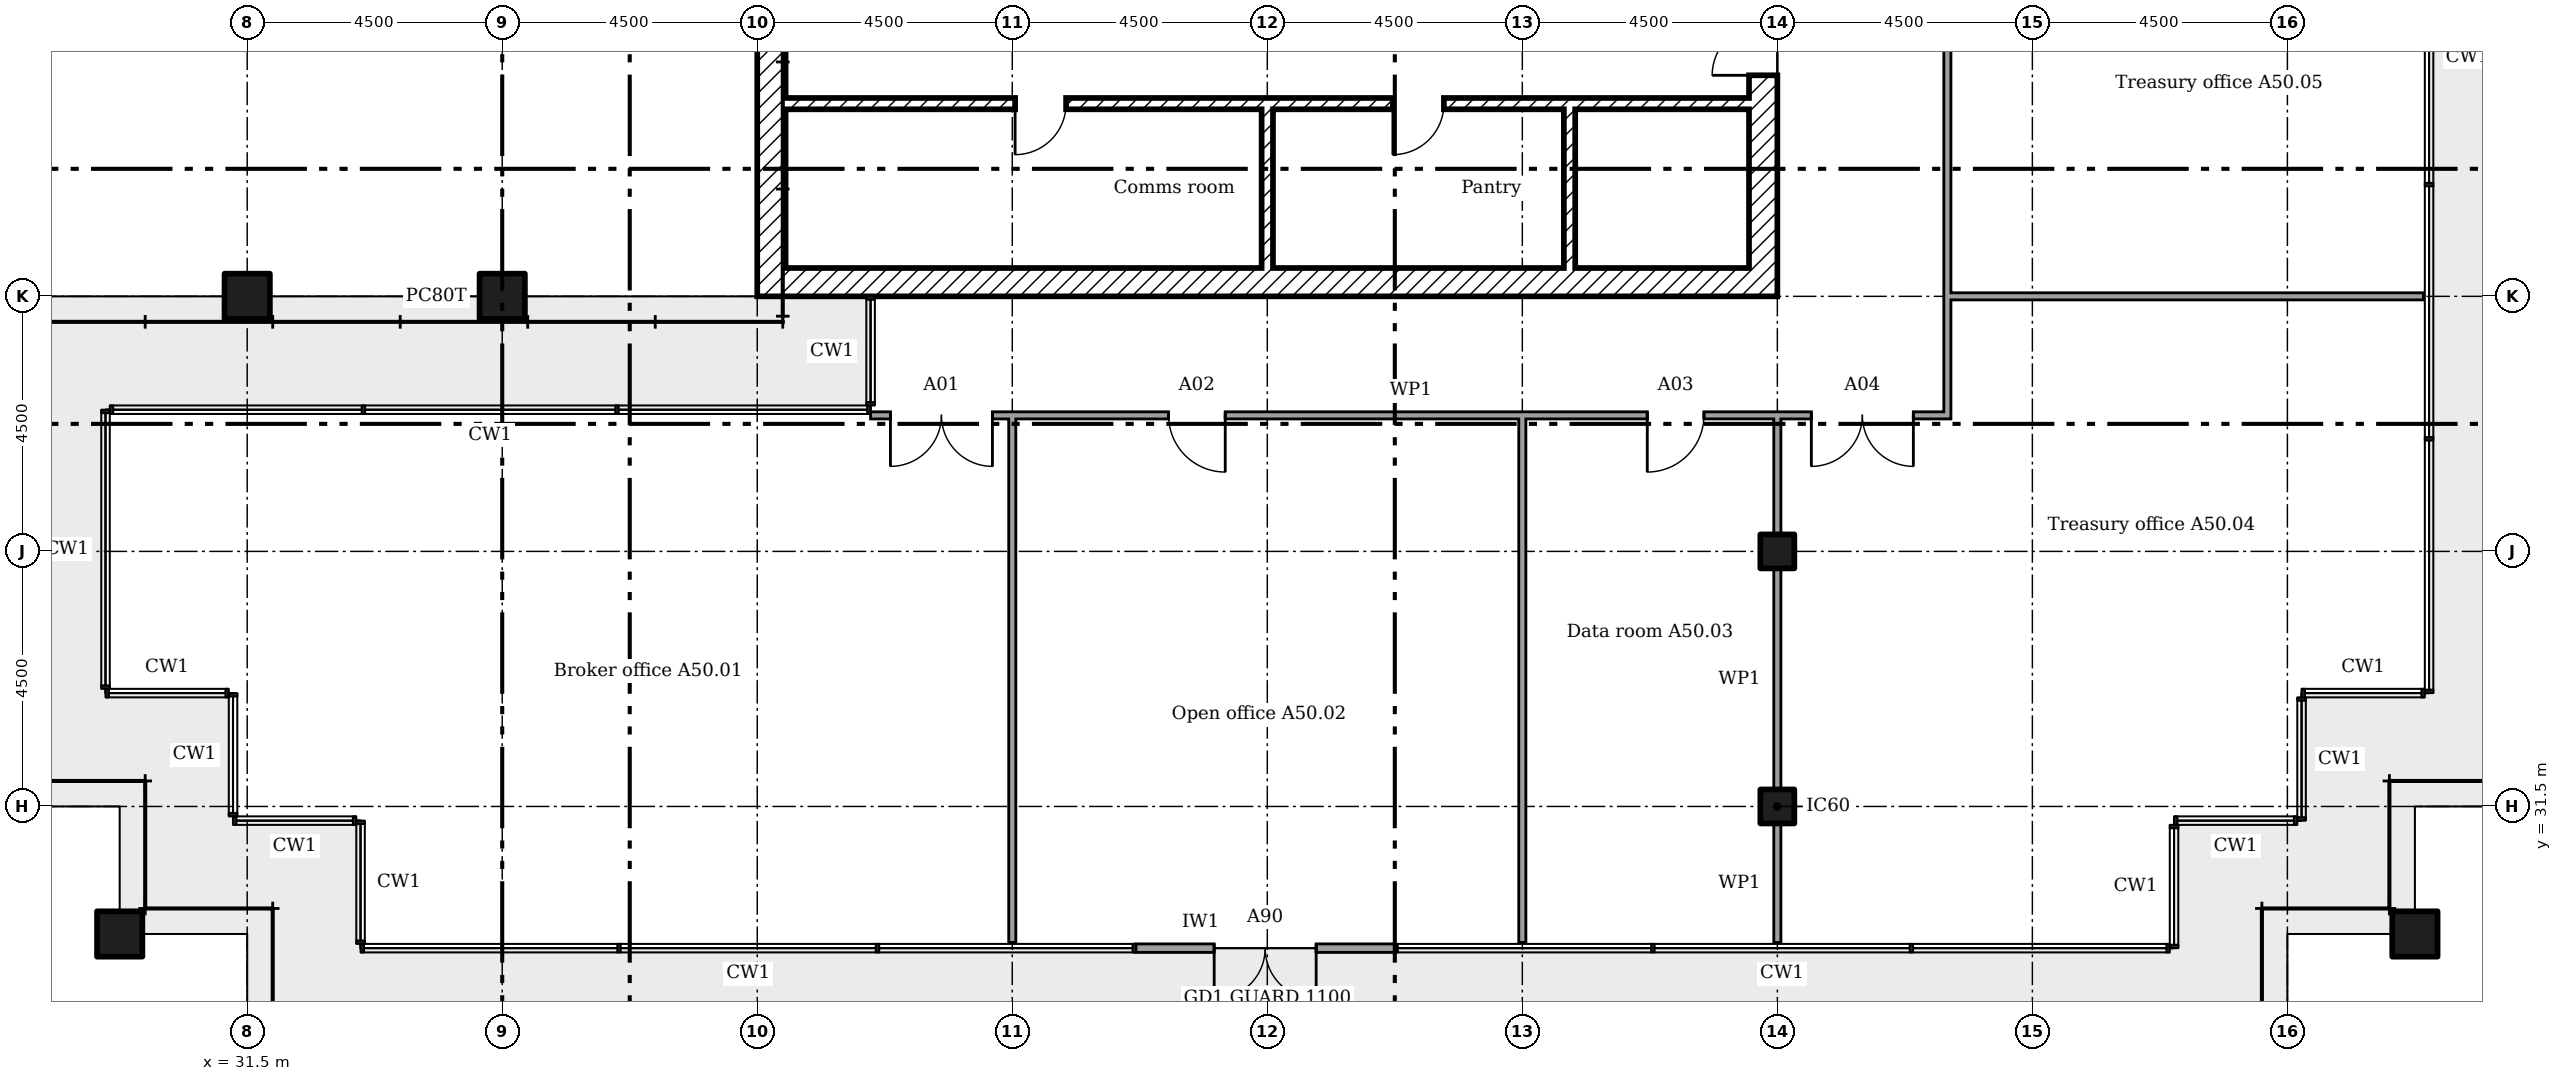
"""IFC4 building model, lengths in metres.
Left out: names, types, materials, properties, quantities, classifications, styles, units other than length and angle.
Written with IfcOpenShell. Run it as: python <this file> out.ifc"""

import sys

from ifc_helpers import new_model, si_unit, direction, frame, frame_2d, origin, origin_2d, place, context, subcontext, project, spatial, rectangle, extrude, element, fill, save


model = new_model("IFC4")
c1 = context("Model", 3, precision=1e-05, world=origin(), true_north=direction((0.0, 1.0)))
c2 = subcontext(c1, "Body", "Model", "MODEL_VIEW")
j1 = project(units=[si_unit("LENGTHUNIT", "METRE"), si_unit("PLANEANGLEUNIT", "RADIAN")], contexts=[c1])
p1 = place(None, origin())
s1 = spatial("IfcSite", under=j1, at=p1, CompositionType="ELEMENT")
p2 = place(p1, origin())
s2 = spatial("IfcBuilding", under=s1, at=p2, CompositionType="ELEMENT")
p3 = place(p2, frame((0.0, 0.0, 199.2)))
s3 = spatial("IfcBuildingStorey", under=s2, at=p3, CompositionType="ELEMENT", Elevation=199.2)
for number, where in (
    (1, (69.75, 29.25, 0.0)),
    (2, (36.0, 40.5, 0.0)),
    (3, (31.5, 40.5, 0.0)),
    (4, (29.25, 29.25, 0.0)),
):
    element("IfcColumn", number, at=place(p3, frame(where)), inside=s3, PredefinedType="COLUMN", context=c2, shape_type="SweptSolid", body=[
        extrude(rectangle(XDim=0.8, YDim=0.8, at=origin_2d()), origin(), (0.0, 0.0, 1.0), 3.6),
    ])
for number, where in (
    (5, (58.5, 31.5, 0.0)),
    (6, (58.5, 36.0, 0.0)),
):
    element("IfcColumn", number, at=place(p3, frame(where)), inside=s3, PredefinedType="COLUMN", context=c2, shape_type="SweptSolid", body=[
        extrude(rectangle(XDim=0.6, YDim=0.6, at=origin_2d()), origin(), (0.0, 0.0, 1.0), 3.6),
    ])
p4 = place(p3, frame((47.182, 29.0, 0.0)))
e7 = element("IfcWall", 7, at=p4, inside=s3, PredefinedType="SOLIDWALL", context=c2, shape_type="SweptSolid", body=[
    extrude(rectangle(XDim=4.561, YDim=0.15, at=frame_2d((2.28, 0.0))), origin(), (0.0, 0.0, 1.0), 3.45),
])
p5 = place(p4, frame((1.38, 0.0, 0.0)))
e8 = element("IfcOpeningElement", 8, at=p5, cuts=e7, PredefinedType="OPENING", context=c2, shape_type="SweptSolid", body=[
    extrude(rectangle(XDim=1.8, YDim=2.4, at=frame_2d((0.9, 1.2))), frame((0.0, 0.085, 0.0), z_axis=(0.0, -1.0, 0.0), x_axis=(1.0, 0.0, 0.0)), (0.0, 0.0, 1.0), 0.17),
])
p6 = place(p3, frame((58.25, 40.5, 0.0), z_axis=(0.0, 0.0, 1.0), x_axis=(0.0, 1.0, 0.0)))
e9 = element("IfcWall", 9, at=p6, inside=s3, PredefinedType="SHEAR", context=c2, shape_type="SweptSolid", body=[
    extrude(rectangle(XDim=18.0, YDim=0.5, at=frame_2d((9.0, 0.0))), origin(), (0.0, 0.0, 1.0), 3.35),
])
p7 = place(p6, frame((13.15, 0.0, 0.0)))
e10 = element("IfcOpeningElement", 10, at=p7, cuts=e9, PredefinedType="OPENING", context=c2, shape_type="SweptSolid", body=[
    extrude(rectangle(XDim=1.2, YDim=2.1, at=frame_2d((0.6, 1.05))), frame((0.0, 0.26, 0.0), z_axis=(0.0, -1.0, 0.0), x_axis=(1.0, 0.0, 0.0)), (0.0, 0.0, 1.0), 0.52),
])
p8 = place(p6, frame((3.9, 0.0, 0.0)))
e11 = element("IfcOpeningElement", 11, at=p8, cuts=e9, PredefinedType="OPENING", context=c2, shape_type="SweptSolid", body=[
    extrude(rectangle(XDim=1.8, YDim=2.1, at=frame_2d((0.9, 1.05))), frame((0.0, 0.26, 0.0), z_axis=(0.0, -1.0, 0.0), x_axis=(1.0, 0.0, 0.0)), (0.0, 0.0, 1.0), 0.52),
])
p9 = place(p6, frame((11.525, 0.0, 0.0)))
e12 = element("IfcOpeningElement", 12, at=p9, cuts=e9, PredefinedType="OPENING", context=c2, shape_type="SweptSolid", body=[
    extrude(rectangle(XDim=1.0, YDim=2.1, at=frame_2d((0.5, 1.05))), frame((0.0, 0.26, 0.0), z_axis=(0.0, -1.0, 0.0), x_axis=(1.0, 0.0, 0.0)), (0.0, 0.0, 1.0), 0.52),
])
p10 = place(p3, frame((40.5, 40.75, 0.0)))
e13 = element("IfcWall", 13, at=p10, inside=s3, PredefinedType="SHEAR", context=c2, shape_type="SweptSolid", body=[
    extrude(rectangle(XDim=17.5, YDim=0.5, at=frame_2d((8.75, 0.0))), origin(), (0.0, 0.0, 1.0), 3.35),
])
p11 = place(p3, frame((40.75, 41.0, 0.0), z_axis=(0.0, 0.0, 1.0), x_axis=(0.0, 1.0, 0.0)))
e14 = element("IfcWall", 14, at=p11, inside=s3, PredefinedType="SHEAR", context=c2, shape_type="SweptSolid", body=[
    extrude(rectangle(XDim=17.0, YDim=0.5, at=frame_2d((8.5, 0.0))), origin(), (0.0, 0.0, 1.0), 3.35),
])
for number, where, z_axis, x_axis in (
    (15, (49.5, 41.0, 0.0), (0.0, 0.0, 1.0), (0.0, 1.0, 0.0)),
    (16, (54.833, 41.0, 0.0), (0.0, 0.0, 1.0), (0.0, 1.0, 0.0)),
):
    element("IfcWall", number, at=place(p3, frame(where, z_axis=z_axis, x_axis=x_axis)), inside=s3, PredefinedType="SHEAR", context=c2, shape_type="SweptSolid", body=[
        extrude(rectangle(XDim=2.8, YDim=0.2, at=frame_2d((1.4, 0.0))), origin(), (0.0, 0.0, 1.0), 3.35),
    ])
p12 = place(p3, frame((41.0, 43.9, 0.0)))
e17 = element("IfcWall", 17, at=p12, inside=s3, PredefinedType="SHEAR", context=c2, shape_type="SweptSolid", body=[
    extrude(rectangle(XDim=17.0, YDim=0.2, at=frame_2d((8.5, 0.0))), origin(), (0.0, 0.0, 1.0), 3.35),
])
p13 = place(p12, frame((4.05, 0.0, 0.0)))
e18 = element("IfcOpeningElement", 18, at=p13, cuts=e17, PredefinedType="OPENING", context=c2, shape_type="SweptSolid", body=[
    extrude(rectangle(XDim=0.9, YDim=2.1, at=frame_2d((0.45, 1.05))), frame((0.0, 0.11, 0.0), z_axis=(0.0, -1.0, 0.0), x_axis=(1.0, 0.0, 0.0)), (0.0, 0.0, 1.0), 0.22),
])
p14 = place(p12, frame((10.717, 0.0, 0.0)))
e19 = element("IfcOpeningElement", 19, at=p14, cuts=e17, PredefinedType="OPENING", context=c2, shape_type="SweptSolid", body=[
    extrude(rectangle(XDim=0.9, YDim=2.1, at=frame_2d((0.45, 1.05))), frame((0.0, 0.11, 0.0), z_axis=(0.0, -1.0, 0.0), x_axis=(1.0, 0.0, 0.0)), (0.0, 0.0, 1.0), 0.22),
])
p15 = place(p3, frame((42.5, 38.4, 0.0)))
e20 = element("IfcWall", 20, at=p15, inside=s3, PredefinedType="PARTITIONING", context=c2, shape_type="SweptSolid", body=[
    extrude(rectangle(XDim=19.062, YDim=0.125, at=frame_2d((9.531, 0.0))), origin(), (0.0, 0.0, 1.0), 3.45),
])
p16 = place(p15, frame((0.35, 0.0, 0.0)))
e21 = element("IfcOpeningElement", 21, at=p16, cuts=e20, PredefinedType="OPENING", context=c2, shape_type="SweptSolid", body=[
    extrude(rectangle(XDim=1.8, YDim=2.1, at=frame_2d((0.9, 1.05))), frame((0.0, 0.073, 0.0), z_axis=(0.0, -1.0, 0.0), x_axis=(1.0, 0.0, 0.0)), (0.0, 0.0, 1.0), 0.145),
])
p17 = place(p15, frame((5.258, 0.0, 0.0)))
e22 = element("IfcOpeningElement", 22, at=p17, cuts=e20, PredefinedType="OPENING", context=c2, shape_type="SweptSolid", body=[
    extrude(rectangle(XDim=1.0, YDim=2.1, at=frame_2d((0.5, 1.05))), frame((0.0, 0.073, 0.0), z_axis=(0.0, -1.0, 0.0), x_axis=(1.0, 0.0, 0.0)), (0.0, 0.0, 1.0), 0.145),
])
p18 = place(p15, frame((13.705, 0.0, 0.0)))
e23 = element("IfcOpeningElement", 23, at=p18, cuts=e20, PredefinedType="OPENING", context=c2, shape_type="SweptSolid", body=[
    extrude(rectangle(XDim=1.0, YDim=2.1, at=frame_2d((0.5, 1.05))), frame((0.0, 0.073, 0.0), z_axis=(0.0, -1.0, 0.0), x_axis=(1.0, 0.0, 0.0)), (0.0, 0.0, 1.0), 0.145),
])
p19 = place(p15, frame((16.6, 0.0, 0.0)))
e24 = element("IfcOpeningElement", 24, at=p19, cuts=e20, PredefinedType="OPENING", context=c2, shape_type="SweptSolid", body=[
    extrude(rectangle(XDim=1.8, YDim=2.1, at=frame_2d((0.9, 1.05))), frame((0.0, 0.073, 0.0), z_axis=(0.0, -1.0, 0.0), x_axis=(1.0, 0.0, 0.0)), (0.0, 0.0, 1.0), 0.145),
])
p20 = place(p3, frame((61.5, 40.5, 0.0)))
e25 = element("IfcWall", 25, at=p20, inside=s3, PredefinedType="PARTITIONING", context=c2, shape_type="SweptSolid", body=[
    extrude(rectangle(XDim=8.4, YDim=0.125, at=frame_2d((4.2, 0.0))), origin(), (0.0, 0.0, 1.0), 2.772),
])
for number, where, z_axis, x_axis in (
    (26, (45.0, 29.1, 0.0), (0.0, 0.0, 1.0), (0.0, 1.0, 0.0)),
    (27, (54.0, 29.1, 0.0), (0.0, 0.0, 1.0), (0.0, 1.0, 0.0)),
):
    element("IfcWall", number, at=place(p3, frame(where, z_axis=z_axis, x_axis=x_axis)), inside=s3, PredefinedType="PARTITIONING", context=c2, shape_type="SweptSolid", body=[
        extrude(rectangle(XDim=9.3, YDim=0.125, at=frame_2d((4.65, 0.0))), origin(), (0.0, 0.0, 1.0), 2.772),
    ])
p21 = place(p3, frame((58.5, 29.1, 0.0), z_axis=(0.0, 0.0, 1.0), x_axis=(0.0, 1.0, 0.0)))
e28 = element("IfcWall", 28, at=p21, inside=s3, PredefinedType="PARTITIONING", context=c2, shape_type="SweptSolid", body=[
    extrude(rectangle(XDim=2.1, YDim=0.125, at=frame_2d((1.05, 0.0))), origin(), (0.0, 0.0, 1.0), 2.676),
])
p22 = place(p3, frame((58.5, 31.8, 0.0), z_axis=(0.0, 0.0, 1.0), x_axis=(0.0, 1.0, 0.0)))
e29 = element("IfcWall", 29, at=p22, inside=s3, PredefinedType="PARTITIONING", context=c2, shape_type="SweptSolid", body=[
    extrude(rectangle(XDim=3.9, YDim=0.125, at=frame_2d((1.95, 0.0))), origin(), (0.0, 0.0, 1.0), 2.676),
])
p23 = place(p3, frame((58.5, 36.3, 0.0), z_axis=(0.0, 0.0, 1.0), x_axis=(0.0, 1.0, 0.0)))
e30 = element("IfcWall", 30, at=p23, inside=s3, PredefinedType="PARTITIONING", context=c2, shape_type="SweptSolid", body=[
    extrude(rectangle(XDim=2.1, YDim=0.125, at=frame_2d((1.05, 0.0))), origin(), (0.0, 0.0, 1.0), 2.676),
])
p24 = place(p3, frame((61.5, 38.462, 0.0), z_axis=(0.0, 0.0, 1.0), x_axis=(0.0, 1.0, 0.0)))
e31 = element("IfcWall", 31, at=p24, inside=s3, PredefinedType="PARTITIONING", context=c2, shape_type="SweptSolid", body=[
    extrude(rectangle(XDim=9.775, YDim=0.125, at=frame_2d((4.888, 0.0))), origin(), (0.0, 0.0, 1.0), 3.45),
])
p25 = place(p5, frame((1.8, 0.0, 0.0), x_axis=(-1.0, 0.0, 0.0)))
e32 = element("IfcDoor", 32, at=p25, inside=s3, OperationType="DOUBLE_DOOR_DOUBLE_SWING", PredefinedType="NOTDEFINED", context=c2, shape_type="SweptSolid", body=[
    extrude(rectangle(XDim=1.8, YDim=2.4, at=frame_2d((0.9, 1.2))), frame((0.0, 0.025, 0.0), z_axis=(0.0, -1.0, 0.0), x_axis=(1.0, 0.0, 0.0)), (0.0, 0.0, 1.0), 0.05),
])
fill(e8, e32)
p26 = place(p8, origin())
e33 = element("IfcDoor", 33, at=p26, inside=s3, OperationType="DOUBLE_DOOR_SINGLE_SWING", PredefinedType="DOOR", context=c2, shape_type="SweptSolid", body=[
    extrude(rectangle(XDim=1.8, YDim=2.1, at=frame_2d((0.9, 1.05))), frame((0.0, 0.025, 0.0), z_axis=(0.0, -1.0, 0.0), x_axis=(1.0, 0.0, 0.0)), (0.0, 0.0, 1.0), 0.05),
])
fill(e11, e33)
p27 = place(p13, frame((0.9, 0.0, 0.0), x_axis=(-1.0, 0.0, 0.0)))
e34 = element("IfcDoor", 34, at=p27, inside=s3, OperationType="SINGLE_SWING_LEFT", PredefinedType="DOOR", context=c2, shape_type="SweptSolid", body=[
    extrude(rectangle(XDim=0.9, YDim=2.1, at=frame_2d((0.45, 1.05))), frame((0.0, 0.025, 0.0), z_axis=(0.0, -1.0, 0.0), x_axis=(1.0, 0.0, 0.0)), (0.0, 0.0, 1.0), 0.05),
])
fill(e18, e34)
p28 = place(p14, frame((0.9, 0.0, 0.0), x_axis=(-1.0, 0.0, 0.0)))
e35 = element("IfcDoor", 35, at=p28, inside=s3, OperationType="SINGLE_SWING_LEFT", PredefinedType="DOOR", context=c2, shape_type="SweptSolid", body=[
    extrude(rectangle(XDim=0.9, YDim=2.1, at=frame_2d((0.45, 1.05))), frame((0.0, 0.025, 0.0), z_axis=(0.0, -1.0, 0.0), x_axis=(1.0, 0.0, 0.0)), (0.0, 0.0, 1.0), 0.05),
])
fill(e19, e35)
p29 = place(p16, frame((1.8, 0.0, 0.0), x_axis=(-1.0, 0.0, 0.0)))
e36 = element("IfcDoor", 36, at=p29, inside=s3, OperationType="DOUBLE_DOOR_SINGLE_SWING", PredefinedType="DOOR", context=c2, shape_type="SweptSolid", body=[
    extrude(rectangle(XDim=1.8, YDim=2.1, at=frame_2d((0.9, 1.05))), frame((0.0, 0.025, 0.0), z_axis=(0.0, -1.0, 0.0), x_axis=(1.0, 0.0, 0.0)), (0.0, 0.0, 1.0), 0.05),
])
fill(e21, e36)
p30 = place(p17, frame((1.0, 0.0, 0.0), x_axis=(-1.0, 0.0, 0.0)))
e37 = element("IfcDoor", 37, at=p30, inside=s3, OperationType="SINGLE_SWING_RIGHT", PredefinedType="DOOR", context=c2, shape_type="SweptSolid", body=[
    extrude(rectangle(XDim=1.0, YDim=2.1, at=frame_2d((0.5, 1.05))), frame((0.0, 0.025, 0.0), z_axis=(0.0, -1.0, 0.0), x_axis=(1.0, 0.0, 0.0)), (0.0, 0.0, 1.0), 0.05),
])
fill(e22, e37)
p31 = place(p18, frame((1.0, 0.0, 0.0), x_axis=(-1.0, 0.0, 0.0)))
e38 = element("IfcDoor", 38, at=p31, inside=s3, OperationType="SINGLE_SWING_LEFT", PredefinedType="DOOR", context=c2, shape_type="SweptSolid", body=[
    extrude(rectangle(XDim=1.0, YDim=2.1, at=frame_2d((0.5, 1.05))), frame((0.0, 0.025, 0.0), z_axis=(0.0, -1.0, 0.0), x_axis=(1.0, 0.0, 0.0)), (0.0, 0.0, 1.0), 0.05),
])
fill(e23, e38)
p32 = place(p19, frame((1.8, 0.0, 0.0), x_axis=(-1.0, 0.0, 0.0)))
e39 = element("IfcDoor", 39, at=p32, inside=s3, OperationType="DOUBLE_DOOR_SINGLE_SWING", PredefinedType="DOOR", context=c2, shape_type="SweptSolid", body=[
    extrude(rectangle(XDim=1.8, YDim=2.1, at=frame_2d((0.9, 1.05))), frame((0.0, 0.025, 0.0), z_axis=(0.0, -1.0, 0.0), x_axis=(1.0, 0.0, 0.0)), (0.0, 0.0, 1.0), 0.05),
])
fill(e24, e39)
save(model, sys.argv[1])
